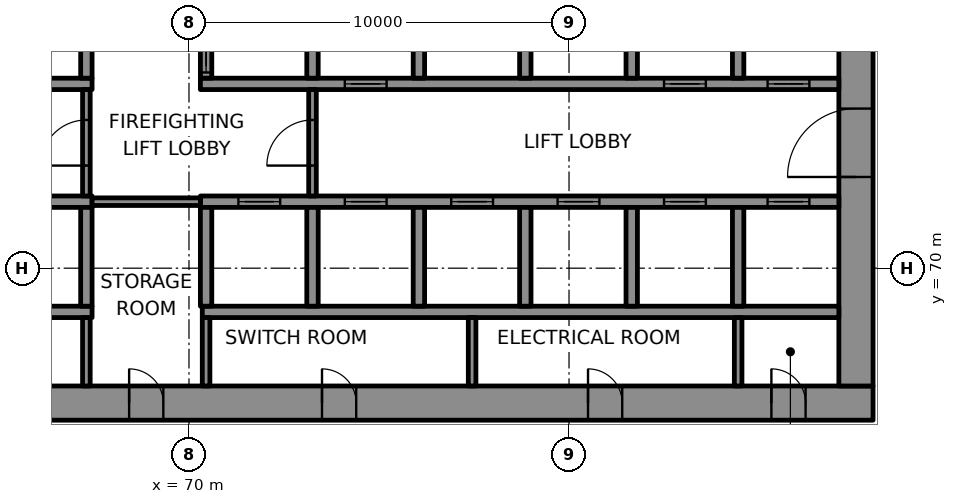
"""IFC4 building model, lengths in metres.
Left out: names, types, materials, properties, quantities, classifications, styles, units other than length and angle.
Written with IfcOpenShell. Run it as: python <this file> out.ifc"""

import sys

from ifc_helpers import new_model, si_unit, direction, frame, frame_2d, origin, place, context, subcontext, project, spatial, rectangle, extrude, element, fill, save


model = new_model("IFC4")
c1 = context("Model", 3, precision=1e-05, world=origin(), true_north=direction((0.0, 1.0)))
c2 = subcontext(c1, "Body", "Model", "MODEL_VIEW")
j1 = project(units=[si_unit("LENGTHUNIT", "METRE"), si_unit("PLANEANGLEUNIT", "RADIAN")], contexts=[c1])
p1 = place(None, origin())
s1 = spatial("IfcSite", under=j1, at=p1, CompositionType="ELEMENT")
p2 = place(p1, origin())
s2 = spatial("IfcBuilding", under=s1, at=p2, CompositionType="ELEMENT")
p3 = place(p2, frame((0.0, 0.0, 65.2)))
s3 = spatial("IfcBuildingStorey", under=s2, at=p3, CompositionType="ELEMENT", Elevation=65.2)
p4 = place(p3, frame((62.0, 66.45, 0.0), z_axis=(0.0, 0.0, 1.0), x_axis=(1.0, 0.0, 0.0)))
e1 = element("IfcWall", 1, at=p4, inside=s3, PredefinedType="SHEAR", context=c2, shape_type="SweptSolid", body=[
    extrude(rectangle(XDim=26.0, YDim=0.9, at=frame_2d((13.0, 0.0))), origin(), (0.0, 0.0, 1.0), 4.0),
])
p5 = place(p4, frame((3.45, 0.0, 0.0)))
e2 = element("IfcOpeningElement", 2, at=p5, cuts=e1, PredefinedType="OPENING", context=c2, shape_type="SweptSolid", body=[
    extrude(rectangle(XDim=0.9, YDim=2.1, at=frame_2d((0.45, 1.05))), frame((0.0, 0.46, 0.0), z_axis=(0.0, -1.0, 0.0), x_axis=(1.0, 0.0, 0.0)), (0.0, 0.0, 1.0), 0.92),
])
p6 = place(p4, frame((6.425, 0.0, 0.0)))
e3 = element("IfcOpeningElement", 3, at=p6, cuts=e1, PredefinedType="OPENING", context=c2, shape_type="SweptSolid", body=[
    extrude(rectangle(XDim=0.9, YDim=2.1, at=frame_2d((0.45, 1.05))), frame((0.0, 0.46, 0.0), z_axis=(0.0, -1.0, 0.0), x_axis=(1.0, 0.0, 0.0)), (0.0, 0.0, 1.0), 0.92),
])
p7 = place(p4, frame((11.5, 0.0, 0.0)))
e4 = element("IfcOpeningElement", 4, at=p7, cuts=e1, PredefinedType="OPENING", context=c2, shape_type="SweptSolid", body=[
    extrude(rectangle(XDim=0.9, YDim=2.1, at=frame_2d((0.45, 1.05))), frame((0.0, 0.46, 0.0), z_axis=(0.0, -1.0, 0.0), x_axis=(1.0, 0.0, 0.0)), (0.0, 0.0, 1.0), 0.92),
])
p8 = place(p4, frame((18.5, 0.0, 0.0)))
e5 = element("IfcOpeningElement", 5, at=p8, cuts=e1, PredefinedType="OPENING", context=c2, shape_type="SweptSolid", body=[
    extrude(rectangle(XDim=0.9, YDim=2.1, at=frame_2d((0.45, 1.05))), frame((0.0, 0.46, 0.0), z_axis=(0.0, -1.0, 0.0), x_axis=(1.0, 0.0, 0.0)), (0.0, 0.0, 1.0), 0.92),
])
p9 = place(p4, frame((23.325, 0.0, 0.0)))
e6 = element("IfcOpeningElement", 6, at=p9, cuts=e1, PredefinedType="OPENING", context=c2, shape_type="SweptSolid", body=[
    extrude(rectangle(XDim=0.9, YDim=2.1, at=frame_2d((0.45, 1.05))), frame((0.0, 0.46, 0.0), z_axis=(0.0, -1.0, 0.0), x_axis=(1.0, 0.0, 0.0)), (0.0, 0.0, 1.0), 0.92),
])
p10 = place(p3, frame((87.55, 66.9, 0.0), z_axis=(0.0, 0.0, 1.0), x_axis=(0.0, 1.0, 0.0)))
e7 = element("IfcWall", 7, at=p10, inside=s3, PredefinedType="SHEAR", context=c2, shape_type="SweptSolid", body=[
    extrude(rectangle(XDim=16.2, YDim=0.9, at=frame_2d((8.1, 0.0))), origin(), (0.0, 0.0, 1.0), 4.0),
])
p11 = place(p10, frame((5.5, 0.0, 0.0)))
e8 = element("IfcOpeningElement", 8, at=p11, cuts=e7, PredefinedType="OPENING", context=c2, shape_type="SweptSolid", body=[
    extrude(rectangle(XDim=1.8, YDim=2.1, at=frame_2d((0.9, 1.05))), frame((0.0, 0.46, 0.0), z_axis=(0.0, -1.0, 0.0), x_axis=(1.0, 0.0, 0.0)), (0.0, 0.0, 1.0), 0.92),
])
p12 = place(p10, frame((12.272, 0.0, 0.0)))
e9 = element("IfcOpeningElement", 9, at=p12, cuts=e7, PredefinedType="OPENING", context=c2, shape_type="SweptSolid", body=[
    extrude(rectangle(XDim=0.9, YDim=2.1, at=frame_2d((0.45, 1.05))), frame((0.0, 0.46, 0.0), z_axis=(0.0, -1.0, 0.0), x_axis=(1.0, 0.0, 0.0)), (0.0, 0.0, 1.0), 0.92),
])
p13 = place(p3, frame((64.35, 68.85, 0.0), z_axis=(0.0, 0.0, 1.0), x_axis=(1.0, 0.0, 0.0)))
e10 = element("IfcWall", 10, at=p13, inside=s3, PredefinedType="SHEAR", context=c2, shape_type="SweptSolid", body=[
    extrude(rectangle(XDim=3.1, YDim=0.3, at=frame_2d((1.55, 0.0))), origin(), (0.0, 0.0, 1.0), 4.0),
])
p14 = place(p3, frame((70.35, 68.85, 0.0), z_axis=(0.0, 0.0, 1.0), x_axis=(1.0, 0.0, 0.0)))
e11 = element("IfcWall", 11, at=p14, inside=s3, PredefinedType="SHEAR", context=c2, shape_type="SweptSolid", body=[
    extrude(rectangle(XDim=16.75, YDim=0.3, at=frame_2d((8.375, 0.0))), origin(), (0.0, 0.0, 1.0), 4.0),
])
p15 = place(p3, frame((64.35, 71.75, 0.0), z_axis=(0.0, 0.0, 1.0), x_axis=(1.0, 0.0, 0.0)))
e12 = element("IfcWall", 12, at=p15, inside=s3, PredefinedType="SHEAR", context=c2, shape_type="SweptSolid", body=[
    extrude(rectangle(XDim=3.1, YDim=0.3, at=frame_2d((1.55, 0.0))), origin(), (0.0, 0.0, 1.0), 4.0),
])
p16 = place(p3, frame((70.3, 71.75, 0.0), z_axis=(0.0, 0.0, 1.0), x_axis=(1.0, 0.0, 0.0)))
e13 = element("IfcWall", 13, at=p16, inside=s3, PredefinedType="SHEAR", context=c2, shape_type="SweptSolid", body=[
    extrude(rectangle(XDim=16.8, YDim=0.3, at=frame_2d((8.4, 0.0))), origin(), (0.0, 0.0, 1.0), 4.0),
])
p17 = place(p16, frame((1.0, 0.0, 0.0)))
e14 = element("IfcOpeningElement", 14, at=p17, cuts=e13, PredefinedType="OPENING", context=c2, shape_type="SweptSolid", body=[
    extrude(rectangle(XDim=1.1, YDim=2.1, at=frame_2d((0.55, 1.05))), frame((0.0, 0.16, 0.0), z_axis=(0.0, -1.0, 0.0), x_axis=(1.0, 0.0, 0.0)), (0.0, 0.0, 1.0), 0.32),
])
p18 = place(p16, frame((3.8, 0.0, 0.0)))
e15 = element("IfcOpeningElement", 15, at=p18, cuts=e13, PredefinedType="OPENING", context=c2, shape_type="SweptSolid", body=[
    extrude(rectangle(XDim=1.1, YDim=2.1, at=frame_2d((0.55, 1.05))), frame((0.0, 0.16, 0.0), z_axis=(0.0, -1.0, 0.0), x_axis=(1.0, 0.0, 0.0)), (0.0, 0.0, 1.0), 0.32),
])
p19 = place(p16, frame((6.6, 0.0, 0.0)))
e16 = element("IfcOpeningElement", 16, at=p19, cuts=e13, PredefinedType="OPENING", context=c2, shape_type="SweptSolid", body=[
    extrude(rectangle(XDim=1.1, YDim=2.1, at=frame_2d((0.55, 1.05))), frame((0.0, 0.16, 0.0), z_axis=(0.0, -1.0, 0.0), x_axis=(1.0, 0.0, 0.0)), (0.0, 0.0, 1.0), 0.32),
])
p20 = place(p16, frame((9.4, 0.0, 0.0)))
e17 = element("IfcOpeningElement", 17, at=p20, cuts=e13, PredefinedType="OPENING", context=c2, shape_type="SweptSolid", body=[
    extrude(rectangle(XDim=1.1, YDim=2.1, at=frame_2d((0.55, 1.05))), frame((0.0, 0.16, 0.0), z_axis=(0.0, -1.0, 0.0), x_axis=(1.0, 0.0, 0.0)), (0.0, 0.0, 1.0), 0.32),
])
p21 = place(p16, frame((12.2, 0.0, 0.0)))
e18 = element("IfcOpeningElement", 18, at=p21, cuts=e13, PredefinedType="OPENING", context=c2, shape_type="SweptSolid", body=[
    extrude(rectangle(XDim=1.1, YDim=2.1, at=frame_2d((0.55, 1.05))), frame((0.0, 0.16, 0.0), z_axis=(0.0, -1.0, 0.0), x_axis=(1.0, 0.0, 0.0)), (0.0, 0.0, 1.0), 0.32),
])
p22 = place(p16, frame((14.925, 0.0, 0.0)))
e19 = element("IfcOpeningElement", 19, at=p22, cuts=e13, PredefinedType="OPENING", context=c2, shape_type="SweptSolid", body=[
    extrude(rectangle(XDim=1.1, YDim=2.1, at=frame_2d((0.55, 1.05))), frame((0.0, 0.16, 0.0), z_axis=(0.0, -1.0, 0.0), x_axis=(1.0, 0.0, 0.0)), (0.0, 0.0, 1.0), 0.32),
])
p23 = place(p3, frame((64.35, 74.85, 0.0), z_axis=(0.0, 0.0, 1.0), x_axis=(1.0, 0.0, 0.0)))
e20 = element("IfcWall", 20, at=p23, inside=s3, PredefinedType="SHEAR", context=c2, shape_type="SweptSolid", body=[
    extrude(rectangle(XDim=3.1, YDim=0.3, at=frame_2d((1.55, 0.0))), origin(), (0.0, 0.0, 1.0), 4.0),
])
p24 = place(p3, frame((70.3, 74.85, 0.0), z_axis=(0.0, 0.0, 1.0), x_axis=(1.0, 0.0, 0.0)))
e21 = element("IfcWall", 21, at=p24, inside=s3, PredefinedType="SHEAR", context=c2, shape_type="SweptSolid", body=[
    extrude(rectangle(XDim=16.8, YDim=0.3, at=frame_2d((8.4, 0.0))), origin(), (0.0, 0.0, 1.0), 4.0),
])
p25 = place(p24, frame((3.8, 0.0, 0.0)))
e22 = element("IfcOpeningElement", 22, at=p25, cuts=e21, PredefinedType="OPENING", context=c2, shape_type="SweptSolid", body=[
    extrude(rectangle(XDim=1.1, YDim=2.1, at=frame_2d((0.55, 1.05))), frame((0.0, 0.16, 0.0), z_axis=(0.0, -1.0, 0.0), x_axis=(1.0, 0.0, 0.0)), (0.0, 0.0, 1.0), 0.32),
])
p26 = place(p24, frame((12.2, 0.0, 0.0)))
e23 = element("IfcOpeningElement", 23, at=p26, cuts=e21, PredefinedType="OPENING", context=c2, shape_type="SweptSolid", body=[
    extrude(rectangle(XDim=1.1, YDim=2.1, at=frame_2d((0.55, 1.05))), frame((0.0, 0.16, 0.0), z_axis=(0.0, -1.0, 0.0), x_axis=(1.0, 0.0, 0.0)), (0.0, 0.0, 1.0), 0.32),
])
p27 = place(p24, frame((14.925, 0.0, 0.0)))
e24 = element("IfcOpeningElement", 24, at=p27, cuts=e21, PredefinedType="OPENING", context=c2, shape_type="SweptSolid", body=[
    extrude(rectangle(XDim=1.1, YDim=2.1, at=frame_2d((0.55, 1.05))), frame((0.0, 0.16, 0.0), z_axis=(0.0, -1.0, 0.0), x_axis=(1.0, 0.0, 0.0)), (0.0, 0.0, 1.0), 0.32),
])
for number, where, z_axis, x_axis in (
    (25, (67.3, 69.0, 0.0), (0.0, 0.0, 1.0), (0.0, 1.0, 0.0)),
    (26, (67.3, 75.0, 0.0), (0.0, 0.0, 1.0), (0.0, 1.0, 0.0)),
    (27, (70.45, 69.0, 0.0), (0.0, 0.0, 1.0), (0.0, 1.0, 0.0)),
):
    element("IfcWall", number, at=place(p3, frame(where, z_axis=z_axis, x_axis=x_axis)), inside=s3, PredefinedType="SHEAR", context=c2, shape_type="SweptSolid", body=[
        extrude(rectangle(XDim=2.6, YDim=0.3, at=frame_2d((1.3, 0.0))), origin(), (0.0, 0.0, 1.0), 4.0),
    ])
p28 = place(p3, frame((70.45, 75.0, 0.0), z_axis=(0.0, 0.0, 1.0), x_axis=(0.0, 1.0, 0.0)))
e28 = element("IfcWall", 28, at=p28, inside=s3, PredefinedType="SHEAR", context=c2, shape_type="SweptSolid", body=[
    extrude(rectangle(XDim=2.6, YDim=0.3, at=frame_2d((1.3, 0.0))), origin(), (0.0, 0.0, 1.0), 4.0),
])
p29 = place(p28, frame((0.15, 0.0, 0.0)))
e29 = element("IfcOpeningElement", 29, at=p29, cuts=e28, PredefinedType="OPENING", context=c2, shape_type="SweptSolid", body=[
    extrude(rectangle(XDim=1.1, YDim=2.1, at=frame_2d((0.55, 1.05))), frame((0.0, 0.16, 0.0), z_axis=(0.0, -1.0, 0.0), x_axis=(1.0, 0.0, 0.0)), (0.0, 0.0, 1.0), 0.32),
])
for number, where, z_axis, x_axis in (
    (30, (73.25, 69.0, 0.0), (0.0, 0.0, 1.0), (0.0, 1.0, 0.0)),
    (31, (73.25, 75.0, 0.0), (0.0, 0.0, 1.0), (0.0, 1.0, 0.0)),
    (32, (76.05, 69.0, 0.0), (0.0, 0.0, 1.0), (0.0, 1.0, 0.0)),
    (33, (76.05, 75.0, 0.0), (0.0, 0.0, 1.0), (0.0, 1.0, 0.0)),
    (34, (78.85, 69.0, 0.0), (0.0, 0.0, 1.0), (0.0, 1.0, 0.0)),
    (35, (78.85, 75.0, 0.0), (0.0, 0.0, 1.0), (0.0, 1.0, 0.0)),
    (36, (81.65, 69.0, 0.0), (0.0, 0.0, 1.0), (0.0, 1.0, 0.0)),
    (37, (81.65, 75.0, 0.0), (0.0, 0.0, 1.0), (0.0, 1.0, 0.0)),
    (38, (84.45, 69.0, 0.0), (0.0, 0.0, 1.0), (0.0, 1.0, 0.0)),
    (39, (84.45, 75.0, 0.0), (0.0, 0.0, 1.0), (0.0, 1.0, 0.0)),
):
    element("IfcWall", number, at=place(p3, frame(where, z_axis=z_axis, x_axis=x_axis)), inside=s3, PredefinedType="SHEAR", context=c2, shape_type="SweptSolid", body=[
        extrude(rectangle(XDim=2.6, YDim=0.3, at=frame_2d((1.3, 0.0))), origin(), (0.0, 0.0, 1.0), 4.0),
    ])
p30 = place(p3, frame((67.45, 71.75, 0.0), z_axis=(0.0, 0.0, 1.0), x_axis=(1.0, 0.0, 0.0)))
e40 = element("IfcWall", 40, at=p30, inside=s3, PredefinedType="PARTITIONING", context=c2, shape_type="SweptSolid", body=[
    extrude(rectangle(XDim=2.85, YDim=0.2, at=frame_2d((1.425, 0.0))), origin(), (0.0, 0.0, 1.0), 4.0),
])
p31 = place(p3, frame((67.3, 66.9, 0.0), z_axis=(0.0, 0.0, 1.0), x_axis=(0.0, 1.0, 0.0)))
e41 = element("IfcWall", 41, at=p31, inside=s3, PredefinedType="PARTITIONING", context=c2, shape_type="SweptSolid", body=[
    extrude(rectangle(XDim=1.8, YDim=0.2, at=frame_2d((0.9, 0.0))), origin(), (0.0, 0.0, 1.0), 4.0),
])
p32 = place(p3, frame((67.3, 71.9, 0.0), z_axis=(0.0, 0.0, 1.0), x_axis=(0.0, 1.0, 0.0)))
e42 = element("IfcWall", 42, at=p32, inside=s3, PredefinedType="PARTITIONING", context=c2, shape_type="SweptSolid", body=[
    extrude(rectangle(XDim=2.8, YDim=0.2, at=frame_2d((1.4, 0.0))), origin(), (0.0, 0.0, 1.0), 4.0),
])
p33 = place(p32, frame((0.8, 0.0, 0.0)))
e43 = element("IfcOpeningElement", 43, at=p33, cuts=e42, PredefinedType="OPENING", context=c2, shape_type="SweptSolid", body=[
    extrude(rectangle(XDim=1.2, YDim=2.1, at=frame_2d((0.6, 1.05))), frame((0.0, 0.11, 0.0), z_axis=(0.0, -1.0, 0.0), x_axis=(1.0, 0.0, 0.0)), (0.0, 0.0, 1.0), 0.22),
])
p34 = place(p3, frame((70.45, 66.9, 0.0), z_axis=(0.0, 0.0, 1.0), x_axis=(0.0, 1.0, 0.0)))
e44 = element("IfcWall", 44, at=p34, inside=s3, PredefinedType="PARTITIONING", context=c2, shape_type="SweptSolid", body=[
    extrude(rectangle(XDim=1.8, YDim=0.2, at=frame_2d((0.9, 0.0))), origin(), (0.0, 0.0, 1.0), 4.0),
])
p35 = place(p3, frame((73.25, 71.9, 0.0), z_axis=(0.0, 0.0, 1.0), x_axis=(0.0, 1.0, 0.0)))
e45 = element("IfcWall", 45, at=p35, inside=s3, PredefinedType="PARTITIONING", context=c2, shape_type="SweptSolid", body=[
    extrude(rectangle(XDim=2.8, YDim=0.2, at=frame_2d((1.4, 0.0))), origin(), (0.0, 0.0, 1.0), 4.0),
])
p36 = place(p35, frame((0.8, 0.0, 0.0)))
e46 = element("IfcOpeningElement", 46, at=p36, cuts=e45, PredefinedType="OPENING", context=c2, shape_type="SweptSolid", body=[
    extrude(rectangle(XDim=1.2, YDim=2.1, at=frame_2d((0.6, 1.05))), frame((0.0, 0.11, 0.0), z_axis=(0.0, -1.0, 0.0), x_axis=(1.0, 0.0, 0.0)), (0.0, 0.0, 1.0), 0.22),
])
for number, where, z_axis, x_axis in (
    (47, (77.45, 66.9, 0.0), (0.0, 0.0, 1.0), (0.0, 1.0, 0.0)),
    (48, (84.45, 66.9, 0.0), (0.0, 0.0, 1.0), (0.0, 1.0, 0.0)),
):
    element("IfcWall", number, at=place(p3, frame(where, z_axis=z_axis, x_axis=x_axis)), inside=s3, PredefinedType="PARTITIONING", context=c2, shape_type="SweptSolid", body=[
        extrude(rectangle(XDim=1.8, YDim=0.2, at=frame_2d((0.9, 0.0))), origin(), (0.0, 0.0, 1.0), 4.0),
    ])
p37 = place(p17, origin())
e49 = element("IfcDoor", 49, at=p37, inside=s3, OperationType="DOUBLE_DOOR_SLIDING", PredefinedType="DOOR", context=c2, shape_type="SweptSolid", body=[
    extrude(rectangle(XDim=1.1, YDim=2.1, at=frame_2d((0.55, 1.05))), frame((0.0, 0.025, 0.0), z_axis=(0.0, -1.0, 0.0), x_axis=(1.0, 0.0, 0.0)), (0.0, 0.0, 1.0), 0.05),
])
fill(e14, e49)
p38 = place(p18, origin())
e50 = element("IfcDoor", 50, at=p38, inside=s3, OperationType="DOUBLE_DOOR_SLIDING", PredefinedType="DOOR", context=c2, shape_type="SweptSolid", body=[
    extrude(rectangle(XDim=1.1, YDim=2.1, at=frame_2d((0.55, 1.05))), frame((0.0, 0.025, 0.0), z_axis=(0.0, -1.0, 0.0), x_axis=(1.0, 0.0, 0.0)), (0.0, 0.0, 1.0), 0.05),
])
fill(e15, e50)
p39 = place(p19, origin())
e51 = element("IfcDoor", 51, at=p39, inside=s3, OperationType="DOUBLE_DOOR_SLIDING", PredefinedType="DOOR", context=c2, shape_type="SweptSolid", body=[
    extrude(rectangle(XDim=1.1, YDim=2.1, at=frame_2d((0.55, 1.05))), frame((0.0, 0.025, 0.0), z_axis=(0.0, -1.0, 0.0), x_axis=(1.0, 0.0, 0.0)), (0.0, 0.0, 1.0), 0.05),
])
fill(e16, e51)
p40 = place(p20, origin())
e52 = element("IfcDoor", 52, at=p40, inside=s3, OperationType="DOUBLE_DOOR_SLIDING", PredefinedType="DOOR", context=c2, shape_type="SweptSolid", body=[
    extrude(rectangle(XDim=1.1, YDim=2.1, at=frame_2d((0.55, 1.05))), frame((0.0, 0.025, 0.0), z_axis=(0.0, -1.0, 0.0), x_axis=(1.0, 0.0, 0.0)), (0.0, 0.0, 1.0), 0.05),
])
fill(e17, e52)
p41 = place(p21, origin())
e53 = element("IfcDoor", 53, at=p41, inside=s3, OperationType="DOUBLE_DOOR_SLIDING", PredefinedType="DOOR", context=c2, shape_type="SweptSolid", body=[
    extrude(rectangle(XDim=1.1, YDim=2.1, at=frame_2d((0.55, 1.05))), frame((0.0, 0.025, 0.0), z_axis=(0.0, -1.0, 0.0), x_axis=(1.0, 0.0, 0.0)), (0.0, 0.0, 1.0), 0.05),
])
fill(e18, e53)
p42 = place(p22, origin())
e54 = element("IfcDoor", 54, at=p42, inside=s3, OperationType="DOUBLE_DOOR_SLIDING", PredefinedType="DOOR", context=c2, shape_type="SweptSolid", body=[
    extrude(rectangle(XDim=1.1, YDim=2.1, at=frame_2d((0.55, 1.05))), frame((0.0, 0.025, 0.0), z_axis=(0.0, -1.0, 0.0), x_axis=(1.0, 0.0, 0.0)), (0.0, 0.0, 1.0), 0.05),
])
fill(e19, e54)
p43 = place(p29, origin())
e55 = element("IfcDoor", 55, at=p43, inside=s3, OperationType="DOUBLE_DOOR_SLIDING", PredefinedType="DOOR", context=c2, shape_type="SweptSolid", body=[
    extrude(rectangle(XDim=1.1, YDim=2.1, at=frame_2d((0.55, 1.05))), frame((0.0, 0.025, 0.0), z_axis=(0.0, -1.0, 0.0), x_axis=(1.0, 0.0, 0.0)), (0.0, 0.0, 1.0), 0.05),
])
fill(e29, e55)
p44 = place(p25, origin())
e56 = element("IfcDoor", 56, at=p44, inside=s3, OperationType="DOUBLE_DOOR_SLIDING", PredefinedType="DOOR", context=c2, shape_type="SweptSolid", body=[
    extrude(rectangle(XDim=1.1, YDim=2.1, at=frame_2d((0.55, 1.05))), frame((0.0, 0.025, 0.0), z_axis=(0.0, -1.0, 0.0), x_axis=(1.0, 0.0, 0.0)), (0.0, 0.0, 1.0), 0.05),
])
fill(e22, e56)
p45 = place(p26, origin())
e57 = element("IfcDoor", 57, at=p45, inside=s3, OperationType="DOUBLE_DOOR_SLIDING", PredefinedType="DOOR", context=c2, shape_type="SweptSolid", body=[
    extrude(rectangle(XDim=1.1, YDim=2.1, at=frame_2d((0.55, 1.05))), frame((0.0, 0.025, 0.0), z_axis=(0.0, -1.0, 0.0), x_axis=(1.0, 0.0, 0.0)), (0.0, 0.0, 1.0), 0.05),
])
fill(e23, e57)
p46 = place(p27, origin())
e58 = element("IfcDoor", 58, at=p46, inside=s3, OperationType="DOUBLE_DOOR_SLIDING", PredefinedType="DOOR", context=c2, shape_type="SweptSolid", body=[
    extrude(rectangle(XDim=1.1, YDim=2.1, at=frame_2d((0.55, 1.05))), frame((0.0, 0.025, 0.0), z_axis=(0.0, -1.0, 0.0), x_axis=(1.0, 0.0, 0.0)), (0.0, 0.0, 1.0), 0.05),
])
fill(e24, e58)
p47 = place(p36, origin())
e59 = element("IfcDoor", 59, at=p47, inside=s3, OperationType="SINGLE_SWING_LEFT", PredefinedType="DOOR", context=c2, shape_type="SweptSolid", body=[
    extrude(rectangle(XDim=1.2, YDim=2.1, at=frame_2d((0.6, 1.05))), frame((0.0, 0.025, 0.0), z_axis=(0.0, -1.0, 0.0), x_axis=(1.0, 0.0, 0.0)), (0.0, 0.0, 1.0), 0.05),
])
fill(e46, e59)
p48 = place(p33, origin())
e60 = element("IfcDoor", 60, at=p48, inside=s3, OperationType="SINGLE_SWING_RIGHT", PredefinedType="DOOR", context=c2, shape_type="SweptSolid", body=[
    extrude(rectangle(XDim=1.2, YDim=2.1, at=frame_2d((0.6, 1.05))), frame((0.0, 0.025, 0.0), z_axis=(0.0, -1.0, 0.0), x_axis=(1.0, 0.0, 0.0)), (0.0, 0.0, 1.0), 0.05),
])
fill(e43, e60)
p49 = place(p11, origin())
e61 = element("IfcDoor", 61, at=p49, inside=s3, OperationType="SINGLE_SWING_RIGHT", PredefinedType="DOOR", context=c2, shape_type="SweptSolid", body=[
    extrude(rectangle(XDim=1.8, YDim=2.1, at=frame_2d((0.9, 1.05))), frame((0.0, 0.17, 0.0), z_axis=(0.0, -1.0, 0.0), x_axis=(1.0, 0.0, 0.0)), (0.0, 0.0, 1.0), 0.34),
])
fill(e8, e61)
p50 = place(p6, origin())
e62 = element("IfcDoor", 62, at=p50, inside=s3, OperationType="SINGLE_SWING_RIGHT", PredefinedType="DOOR", context=c2, shape_type="SweptSolid", body=[
    extrude(rectangle(XDim=0.9, YDim=2.1, at=frame_2d((0.45, 1.05))), frame((0.0, 0.17, 0.0), z_axis=(0.0, -1.0, 0.0), x_axis=(1.0, 0.0, 0.0)), (0.0, 0.0, 1.0), 0.34),
])
fill(e3, e62)
p51 = place(p7, origin())
e63 = element("IfcDoor", 63, at=p51, inside=s3, OperationType="SINGLE_SWING_LEFT", PredefinedType="DOOR", context=c2, shape_type="SweptSolid", body=[
    extrude(rectangle(XDim=0.9, YDim=2.1, at=frame_2d((0.45, 1.05))), frame((0.0, 0.17, 0.0), z_axis=(0.0, -1.0, 0.0), x_axis=(1.0, 0.0, 0.0)), (0.0, 0.0, 1.0), 0.34),
])
fill(e4, e63)
p52 = place(p8, origin())
e64 = element("IfcDoor", 64, at=p52, inside=s3, OperationType="SINGLE_SWING_RIGHT", PredefinedType="DOOR", context=c2, shape_type="SweptSolid", body=[
    extrude(rectangle(XDim=0.9, YDim=2.1, at=frame_2d((0.45, 1.05))), frame((0.0, 0.17, 0.0), z_axis=(0.0, -1.0, 0.0), x_axis=(1.0, 0.0, 0.0)), (0.0, 0.0, 1.0), 0.34),
])
fill(e5, e64)
p53 = place(p9, origin())
e65 = element("IfcDoor", 65, at=p53, inside=s3, OperationType="SINGLE_SWING_LEFT", PredefinedType="DOOR", context=c2, shape_type="SweptSolid", body=[
    extrude(rectangle(XDim=0.9, YDim=2.1, at=frame_2d((0.45, 1.05))), frame((0.0, 0.17, 0.0), z_axis=(0.0, -1.0, 0.0), x_axis=(1.0, 0.0, 0.0)), (0.0, 0.0, 1.0), 0.34),
])
fill(e6, e65)
save(model, sys.argv[1])
